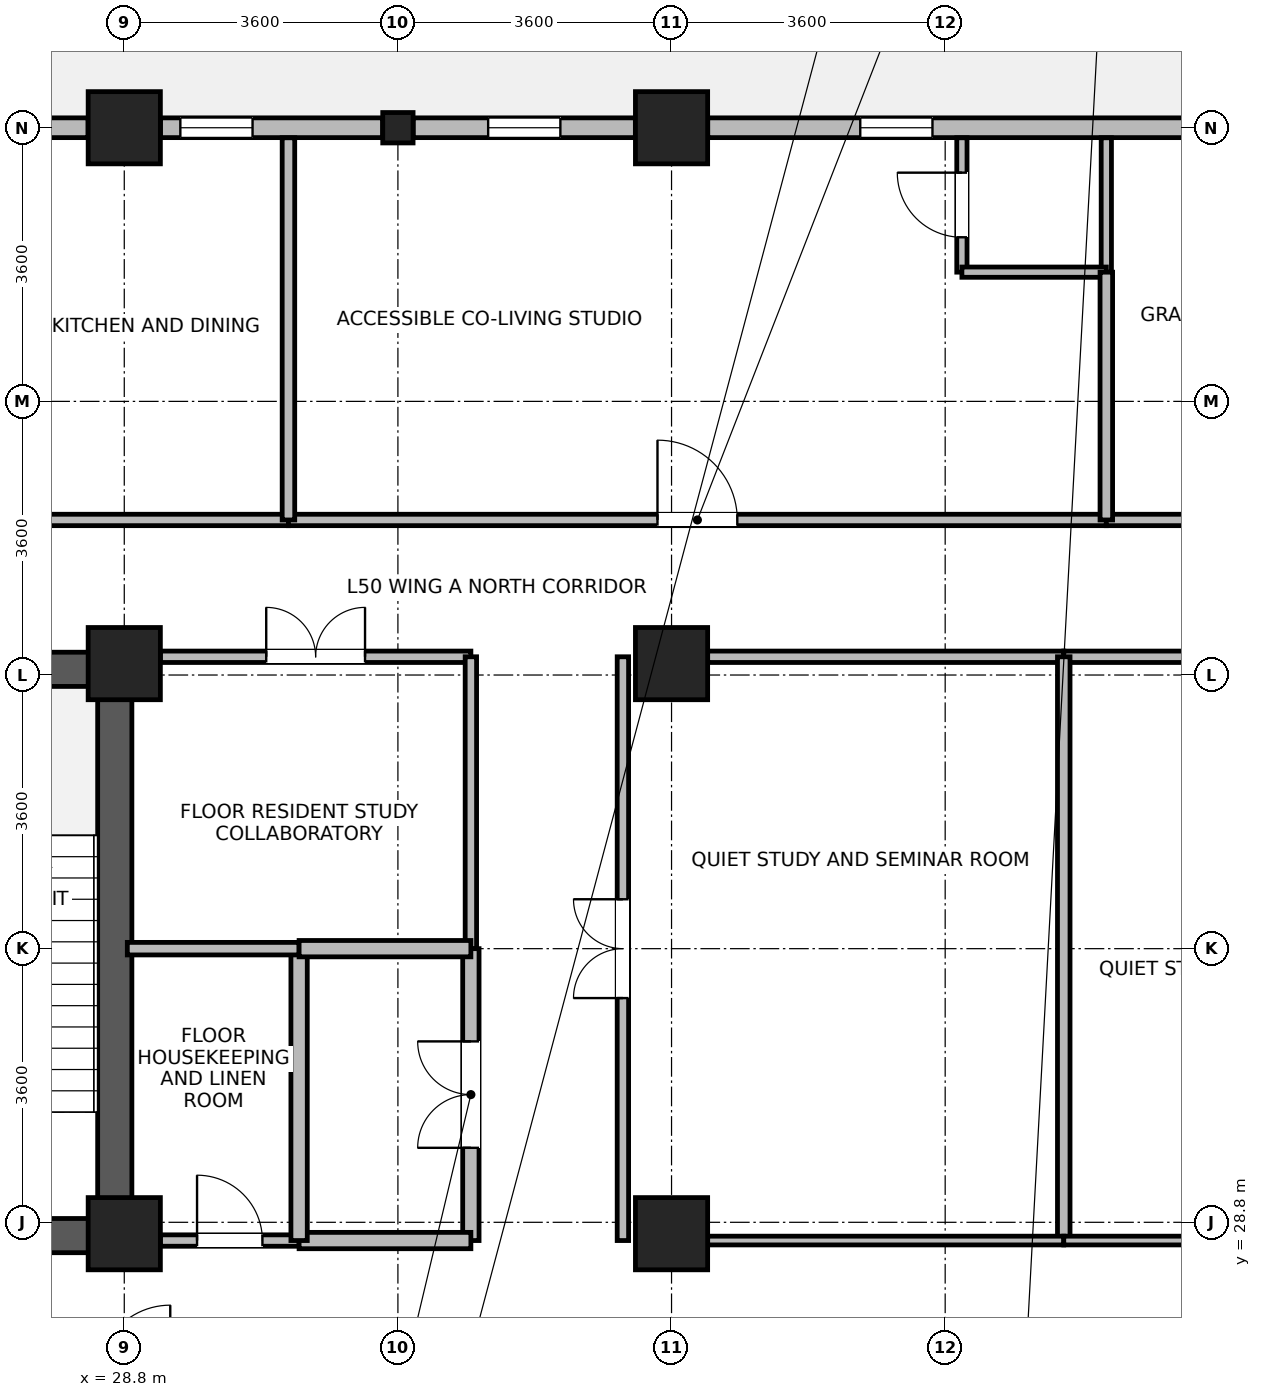
"""IFC4 building model, lengths in metres.
Left out: names, types, materials, properties, quantities, classifications, styles, units other than length and angle.
Written with IfcOpenShell. Run it as: python <this file> out.ifc"""

import sys

from ifc_helpers import new_model, si_unit, direction, frame, frame_2d, origin, origin_2d, place, context, subcontext, project, spatial, rectangle, i_section, extrude, source, transform, mapped, element, fill, save


model = new_model("IFC4")
c1 = context("Model", 3, precision=1e-05, world=origin(), true_north=direction((0.0, 1.0)))
c2 = subcontext(c1, "Body", "Model", "MODEL_VIEW")
j1 = project(units=[si_unit("LENGTHUNIT", "METRE"), si_unit("PLANEANGLEUNIT", "RADIAN")], contexts=[c1])
p1 = place(None, origin())
s1 = spatial("IfcSite", under=j1, at=p1, CompositionType="ELEMENT")
p2 = place(p1, origin())
s2 = spatial("IfcBuilding", under=s1, at=p2, CompositionType="ELEMENT")
p3 = place(p2, frame((0.0, 0.0, 197.2)))
s3 = spatial("IfcBuildingStorey", under=s2, at=p3, CompositionType="ELEMENT", Elevation=197.2)
p4 = place(p3, frame((28.675, 28.4, 0.0), z_axis=(0.0, 0.0, 1.0), x_axis=(0.0, 1.0, 0.0)))
e1 = element("IfcWall", 1, at=p4, inside=s3, PredefinedType="SHEAR", context=c2, shape_type="SweptSolid", body=[
    extrude(rectangle(XDim=7.9, YDim=0.45, at=frame_2d((3.95, 0.0))), origin(), (0.0, 0.0, 1.0), 4.37),
])
for number, where, z_axis, x_axis in (
    (2, (25.25, 28.625, 0.0), (0.0, 0.0, 1.0), (1.0, 0.0, 0.0)),
    (3, (25.25, 36.075, 0.0), (0.0, 0.0, 1.0), (1.0, 0.0, 0.0)),
):
    element("IfcWall", number, at=place(p3, frame(where, z_axis=z_axis, x_axis=x_axis)), inside=s3, PredefinedType="SHEAR", context=c2, shape_type="SweptSolid", body=[
        extrude(rectangle(XDim=3.2, YDim=0.45, at=frame_2d((1.6, 0.0))), origin(), (0.0, 0.0, 1.0), 4.37),
    ])
m1 = source(origin(), c2, "Body", "SweptSolid", [
    extrude(rectangle(XDim=0.95, YDim=0.95, at=origin_2d()), origin(), (0.0, 0.0, 1.0), 4.6),
])
for number, where, z_axis, x_axis in (
    (4, (28.8, 28.65, 0.0), (0.0, 0.0, 1.0), (1.0, 0.0, 0.0)),
    (5, (28.8, 36.15, 0.0), (0.0, 0.0, 1.0), (1.0, 0.0, 0.0)),
    (6, (28.8, 43.2, 0.0), (0.0, 0.0, 1.0), (1.0, 0.0, 0.0)),
    (7, (36.0, 43.2, 0.0), (0.0, 0.0, 1.0), (1.0, 0.0, 0.0)),
    (8, (36.0, 28.65, 0.0), (0.0, 0.0, 1.0), (1.0, 0.0, 0.0)),
    (9, (36.0, 36.15, 0.0), (0.0, 0.0, 1.0), (1.0, 0.0, 0.0)),
):
    element("IfcColumn", number, at=place(p3, frame(where, z_axis=z_axis, x_axis=x_axis)), inside=s3, PredefinedType="COLUMN", context=c2, shape_type="MappedRepresentation", body=[
        mapped(m1, transform((0.0, 0.0, 0.0), x_axis=(1.0, 0.0, 0.0), y_axis=(0.0, 1.0, 0.0), z_axis=(0.0, 0.0, 1.0), scale=1.0)),
    ])
m2 = source(origin(), c2, "Body", "SweptSolid", [
    extrude(i_section(OverallWidth=0.399, OverallDepth=0.4, WebThickness=0.017, FlangeThickness=0.023, FilletRadius=0.015, at=origin_2d()), origin(), (0.0, 0.0, 1.0), 4.6),
])
p5 = place(p3, frame((32.4, 43.2, 0.0), z_axis=(0.0, 0.0, 1.0), x_axis=(1.0, 0.0, 0.0)))
e10 = element("IfcColumn", 10, at=p5, inside=s3, PredefinedType="COLUMN", context=c2, shape_type="MappedRepresentation", body=[
    mapped(m2, transform((0.0, 0.0, 0.0), x_axis=(1.0, 0.0, 0.0), y_axis=(0.0, 1.0, 0.0), z_axis=(0.0, 0.0, 1.0), scale=1.0)),
])
p6 = place(p3, frame((36.476, 43.2, 0.0), z_axis=(0.0, 0.0, 1.0), x_axis=(1.0, 0.0, 0.0)))
e11 = element("IfcWall", 11, at=p6, inside=s3, PredefinedType="STANDARD", context=c2, shape_type="SweptSolid", body=[
    extrude(rectangle(XDim=9.848, YDim=0.26, at=frame_2d((4.924, 0.0))), origin(), (0.0, 0.0, 1.0), 3.9),
])
p7 = place(p6, frame((2.007, 0.0, 0.85)))
e12 = element("IfcOpeningElement", 12, at=p7, cuts=e11, PredefinedType="OPENING", context=c2, shape_type="SweptSolid", body=[
    extrude(rectangle(XDim=0.95, YDim=1.75, at=frame_2d((0.475, 0.875))), frame((0.0, 0.14, 0.0), z_axis=(0.0, -1.0, 0.0), x_axis=(1.0, 0.0, 0.0)), (0.0, 0.0, 1.0), 0.28),
])
p8 = place(p6, frame((6.891, 0.0, 0.85)))
e13 = element("IfcOpeningElement", 13, at=p8, cuts=e11, PredefinedType="OPENING", context=c2, shape_type="SweptSolid", body=[
    extrude(rectangle(XDim=0.95, YDim=1.75, at=frame_2d((0.475, 0.875))), frame((0.0, 0.14, 0.0), z_axis=(0.0, -1.0, 0.0), x_axis=(1.0, 0.0, 0.0)), (0.0, 0.0, 1.0), 0.28),
])
p9 = place(p3, frame((32.601, 43.2, 0.0), z_axis=(0.0, 0.0, 1.0), x_axis=(1.0, 0.0, 0.0)))
e14 = element("IfcWall", 14, at=p9, inside=s3, PredefinedType="STANDARD", context=c2, shape_type="SweptSolid", body=[
    extrude(rectangle(XDim=2.923, YDim=0.26, at=frame_2d((1.462, 0.0))), origin(), (0.0, 0.0, 1.0), 3.9),
])
p10 = place(p9, frame((0.987, 0.0, 0.85)))
e15 = element("IfcOpeningElement", 15, at=p10, cuts=e14, PredefinedType="OPENING", context=c2, shape_type="SweptSolid", body=[
    extrude(rectangle(XDim=0.95, YDim=1.75, at=frame_2d((0.475, 0.875))), frame((0.0, 0.14, 0.0), z_axis=(0.0, -1.0, 0.0), x_axis=(1.0, 0.0, 0.0)), (0.0, 0.0, 1.0), 0.28),
])
p11 = place(p3, frame((29.276, 43.2, 0.0), z_axis=(0.0, 0.0, 1.0), x_axis=(1.0, 0.0, 0.0)))
e16 = element("IfcWall", 16, at=p11, inside=s3, PredefinedType="STANDARD", context=c2, shape_type="SweptSolid", body=[
    extrude(rectangle(XDim=2.924, YDim=0.26, at=frame_2d((1.462, 0.0))), origin(), (0.0, 0.0, 1.0), 3.9),
])
p12 = place(p11, frame((0.262, 0.0, 0.85)))
e17 = element("IfcOpeningElement", 17, at=p12, cuts=e16, PredefinedType="OPENING", context=c2, shape_type="SweptSolid", body=[
    extrude(rectangle(XDim=0.95, YDim=1.75, at=frame_2d((0.475, 0.875))), frame((0.0, 0.14, 0.0), z_axis=(0.0, -1.0, 0.0), x_axis=(1.0, 0.0, 0.0)), (0.0, 0.0, 1.0), 0.28),
])
p13 = place(p3, frame((25.4, 43.2, 0.0), z_axis=(0.0, 0.0, 1.0), x_axis=(1.0, 0.0, 0.0)))
e18 = element("IfcWall", 18, at=p13, inside=s3, PredefinedType="STANDARD", context=c2, shape_type="SweptSolid", body=[
    extrude(rectangle(XDim=2.924, YDim=0.26, at=frame_2d((1.462, 0.0))), origin(), (0.0, 0.0, 1.0), 3.9),
])
p14 = place(p13, frame((0.987, 0.0, 0.85)))
e19 = element("IfcOpeningElement", 19, at=p14, cuts=e18, PredefinedType="OPENING", context=c2, shape_type="SweptSolid", body=[
    extrude(rectangle(XDim=0.95, YDim=1.75, at=frame_2d((0.475, 0.875))), frame((0.0, 0.14, 0.0), z_axis=(0.0, -1.0, 0.0), x_axis=(1.0, 0.0, 0.0)), (0.0, 0.0, 1.0), 0.28),
])
p15 = place(p3, frame((39.82, 41.3, 0.0), z_axis=(0.0, 0.0, 1.0), x_axis=(0.0, 1.0, 0.0)))
e20 = element("IfcWall", 20, at=p15, inside=s3, PredefinedType="PARTITIONING", context=c2, shape_type="SweptSolid", body=[
    extrude(rectangle(XDim=1.768, YDim=0.135, at=frame_2d((0.884, 0.0))), origin(), (0.0, 0.0, 1.0), 4.35),
])
p16 = place(p15, frame((0.459, 0.0, 0.0)))
e21 = element("IfcOpeningElement", 21, at=p16, cuts=e20, PredefinedType="OPENING", context=c2, shape_type="SweptSolid", body=[
    extrude(rectangle(XDim=0.85, YDim=2.04, at=frame_2d((0.425, 1.02))), frame((0.0, 0.078, 0.0), z_axis=(0.0, -1.0, 0.0), x_axis=(1.0, 0.0, 0.0)), (0.0, 0.0, 1.0), 0.155),
])
p17 = place(p3, frame((41.72, 41.3, 0.0), z_axis=(0.0, 0.0, 1.0), x_axis=(0.0, 1.0, 0.0)))
e22 = element("IfcWall", 22, at=p17, inside=s3, PredefinedType="PARTITIONING", context=c2, shape_type="SweptSolid", body=[
    extrude(rectangle(XDim=1.768, YDim=0.135, at=frame_2d((0.884, 0.0))), origin(), (0.0, 0.0, 1.0), 4.35),
])
p18 = place(p3, frame((39.82, 41.3, 0.0), z_axis=(0.0, 0.0, 1.0), x_axis=(1.0, 0.0, 0.0)))
e23 = element("IfcWall", 23, at=p18, inside=s3, PredefinedType="PARTITIONING", context=c2, shape_type="SweptSolid", body=[
    extrude(rectangle(XDim=1.9, YDim=0.135, at=frame_2d((0.95, 0.0))), origin(), (0.0, 0.0, 1.0), 4.35),
])
p19 = place(p3, frame((19.38, 38.04, 0.0), z_axis=(0.0, 0.0, 1.0), x_axis=(1.0, 0.0, 0.0)))
e24 = element("IfcWall", 24, at=p19, inside=s3, PredefinedType="PARTITIONING", context=c2, shape_type="SweptSolid", body=[
    extrude(rectangle(XDim=11.58, YDim=0.15, at=frame_2d((5.79, 0.0))), origin(), (0.0, 0.0, 1.0), 4.35),
])
p20 = place(p19, frame((5.34, 0.0, 0.0)))
e25 = element("IfcOpeningElement", 25, at=p20, cuts=e24, PredefinedType="OPENING", context=c2, shape_type="SweptSolid", body=[
    extrude(rectangle(XDim=0.9, YDim=2.08, at=frame_2d((0.45, 1.04))), frame((0.0, 0.085, 0.0), z_axis=(0.0, -1.0, 0.0), x_axis=(1.0, 0.0, 0.0)), (0.0, 0.0, 1.0), 0.17),
])
p21 = place(p3, frame((30.96, 38.04, 0.0), z_axis=(0.0, 0.0, 1.0), x_axis=(1.0, 0.0, 0.0)))
e26 = element("IfcWall", 26, at=p21, inside=s3, PredefinedType="PARTITIONING", context=c2, shape_type="SweptSolid", body=[
    extrude(rectangle(XDim=10.76, YDim=0.15, at=frame_2d((5.38, 0.0))), origin(), (0.0, 0.0, 1.0), 4.35),
])
p22 = place(p21, frame((4.855, 0.0, 0.0)))
e27 = element("IfcOpeningElement", 27, at=p22, cuts=e26, PredefinedType="OPENING", context=c2, shape_type="SweptSolid", body=[
    extrude(rectangle(XDim=1.05, YDim=2.12, at=frame_2d((0.525, 1.06))), frame((0.0, 0.085, 0.0), z_axis=(0.0, -1.0, 0.0), x_axis=(1.0, 0.0, 0.0)), (0.0, 0.0, 1.0), 0.17),
])
p23 = place(p3, frame((41.72, 38.04, 0.0), z_axis=(0.0, 0.0, 1.0), x_axis=(1.0, 0.0, 0.0)))
e28 = element("IfcWall", 28, at=p23, inside=s3, PredefinedType="PARTITIONING", context=c2, shape_type="SweptSolid", body=[
    extrude(rectangle(XDim=8.92, YDim=0.15, at=frame_2d((4.46, 0.0))), origin(), (0.0, 0.0, 1.0), 4.35),
])
p24 = place(p23, frame((3.985, 0.0, 0.0)))
e29 = element("IfcOpeningElement", 29, at=p24, cuts=e28, PredefinedType="OPENING", context=c2, shape_type="SweptSolid", body=[
    extrude(rectangle(XDim=0.95, YDim=2.1, at=frame_2d((0.475, 1.05))), frame((0.0, 0.085, 0.0), z_axis=(0.0, -1.0, 0.0), x_axis=(1.0, 0.0, 0.0)), (0.0, 0.0, 1.0), 0.17),
])
p25 = place(p3, frame((35.36, 28.56, 0.0), z_axis=(0.0, 0.0, 1.0), x_axis=(0.0, 1.0, 0.0)))
e30 = element("IfcWall", 30, at=p25, inside=s3, PredefinedType="PARTITIONING", context=c2, shape_type="SweptSolid", body=[
    extrude(rectangle(XDim=7.68, YDim=0.15, at=frame_2d((3.84, 0.0))), origin(), (0.0, 0.0, 1.0), 4.35),
])
p26 = place(p25, frame((3.19, 0.0, 0.0)))
e31 = element("IfcOpeningElement", 31, at=p26, cuts=e30, PredefinedType="OPENING", context=c2, shape_type="SweptSolid", body=[
    extrude(rectangle(XDim=1.3, YDim=2.12, at=frame_2d((0.65, 1.06))), frame((0.0, 0.085, 0.0), z_axis=(0.0, -1.0, 0.0), x_axis=(1.0, 0.0, 0.0)), (0.0, 0.0, 1.0), 0.17),
])
p27 = place(p3, frame((36.475, 36.24, 0.0), z_axis=(0.0, 0.0, 1.0), x_axis=(1.0, 0.0, 0.0)))
e32 = element("IfcWall", 32, at=p27, inside=s3, PredefinedType="PARTITIONING", context=c2, shape_type="SweptSolid", body=[
    extrude(rectangle(XDim=4.685, YDim=0.15, at=frame_2d((2.342, 0.0))), origin(), (0.0, 0.0, 1.0), 3.75),
])
p28 = place(p3, frame((41.16, 36.24, 0.0), z_axis=(0.0, 0.0, 1.0), x_axis=(1.0, 0.0, 0.0)))
e33 = element("IfcWall", 33, at=p28, inside=s3, PredefinedType="PARTITIONING", context=c2, shape_type="SweptSolid", body=[
    extrude(rectangle(XDim=5.165, YDim=0.15, at=frame_2d((2.583, 0.0))), origin(), (0.0, 0.0, 1.0), 3.75),
])
p29 = place(p28, frame((1.933, 0.0, 0.0)))
e34 = element("IfcOpeningElement", 34, at=p29, cuts=e33, PredefinedType="OPENING", context=c2, shape_type="SweptSolid", body=[
    extrude(rectangle(XDim=1.3, YDim=2.12, at=frame_2d((0.65, 1.06))), frame((0.0, 0.085, 0.0), z_axis=(0.0, -1.0, 0.0), x_axis=(1.0, 0.0, 0.0)), (0.0, 0.0, 1.0), 0.17),
])
p30 = place(p3, frame((29.275, 36.24, 0.0), z_axis=(0.0, 0.0, 1.0), x_axis=(1.0, 0.0, 0.0)))
e35 = element("IfcWall", 35, at=p30, inside=s3, PredefinedType="PARTITIONING", context=c2, shape_type="SweptSolid", body=[
    extrude(rectangle(XDim=4.085, YDim=0.15, at=frame_2d((2.042, 0.0))), origin(), (0.0, 0.0, 1.0), 3.75),
])
p31 = place(p30, frame((1.393, 0.0, 0.0)))
e36 = element("IfcOpeningElement", 36, at=p31, cuts=e35, PredefinedType="OPENING", context=c2, shape_type="SweptSolid", body=[
    extrude(rectangle(XDim=1.3, YDim=2.12, at=frame_2d((0.65, 1.06))), frame((0.0, 0.085, 0.0), z_axis=(0.0, -1.0, 0.0), x_axis=(1.0, 0.0, 0.0)), (0.0, 0.0, 1.0), 0.17),
])
p32 = place(p3, frame((33.36, 32.4, 0.0), z_axis=(0.0, 0.0, 1.0), x_axis=(0.0, 1.0, 0.0)))
e37 = element("IfcWall", 37, at=p32, inside=s3, PredefinedType="PARTITIONING", context=c2, shape_type="SweptSolid", body=[
    extrude(rectangle(XDim=3.84, YDim=0.15, at=frame_2d((1.92, 0.0))), origin(), (0.0, 0.0, 1.0), 4.35),
])
p33 = place(p3, frame((33.36, 28.56, 0.0), z_axis=(0.0, 0.0, 1.0), x_axis=(0.0, 1.0, 0.0)))
e38 = element("IfcWall", 38, at=p33, inside=s3, PredefinedType="PARTITIONING", context=c2, shape_type="SweptSolid", body=[
    extrude(rectangle(XDim=3.84, YDim=0.215, at=frame_2d((1.92, 0.0))), origin(), (0.0, 0.0, 1.0), 4.35),
])
p34 = place(p33, frame((1.22, 0.0, 0.0)))
e39 = element("IfcOpeningElement", 39, at=p34, cuts=e38, PredefinedType="OPENING", context=c2, shape_type="SweptSolid", body=[
    extrude(rectangle(XDim=1.4, YDim=2.15, at=frame_2d((0.7, 1.075))), frame((0.0, 0.118, 0.0), z_axis=(0.0, -1.0, 0.0), x_axis=(1.0, 0.0, 0.0)), (0.0, 0.0, 1.0), 0.235),
])
p35 = place(p3, frame((29.275, 28.56, 0.0), z_axis=(0.0, 0.0, 1.0), x_axis=(1.0, 0.0, 0.0)))
e40 = element("IfcWall", 40, at=p35, inside=s3, PredefinedType="PARTITIONING", context=c2, shape_type="SweptSolid", body=[
    extrude(rectangle(XDim=1.825, YDim=0.15, at=frame_2d((0.913, 0.0))), origin(), (0.0, 0.0, 1.0), 3.75),
])
p36 = place(p35, frame((0.482, 0.0, 0.0)))
e41 = element("IfcOpeningElement", 41, at=p36, cuts=e40, PredefinedType="OPENING", context=c2, shape_type="SweptSolid", body=[
    extrude(rectangle(XDim=0.86, YDim=2.02, at=frame_2d((0.43, 1.01))), frame((0.0, 0.085, 0.0), z_axis=(0.0, -1.0, 0.0), x_axis=(1.0, 0.0, 0.0)), (0.0, 0.0, 1.0), 0.17),
])
p37 = place(p3, frame((31.1, 28.56, 0.0), z_axis=(0.0, 0.0, 1.0), x_axis=(1.0, 0.0, 0.0)))
e42 = element("IfcWall", 42, at=p37, inside=s3, PredefinedType="PARTITIONING", context=c2, shape_type="SweptSolid", body=[
    extrude(rectangle(XDim=2.26, YDim=0.215, at=frame_2d((1.13, 0.0))), origin(), (0.0, 0.0, 1.0), 3.75),
])
p38 = place(p3, frame((41.16, 28.56, 0.0), z_axis=(0.0, 0.0, 1.0), x_axis=(0.0, 1.0, 0.0)))
e43 = element("IfcWall", 43, at=p38, inside=s3, PredefinedType="PARTITIONING", context=c2, shape_type="SweptSolid", body=[
    extrude(rectangle(XDim=7.68, YDim=0.165, at=frame_2d((3.84, 0.0))), origin(), (0.0, 0.0, 1.0), 4.35),
])
p39 = place(p3, frame((36.475, 28.56, 0.0), z_axis=(0.0, 0.0, 1.0), x_axis=(1.0, 0.0, 0.0)))
e44 = element("IfcWall", 44, at=p39, inside=s3, PredefinedType="PARTITIONING", context=c2, shape_type="SweptSolid", body=[
    extrude(rectangle(XDim=4.685, YDim=0.115, at=frame_2d((2.342, 0.0))), origin(), (0.0, 0.0, 1.0), 3.75),
])
p40 = place(p3, frame((41.16, 28.56, 0.0), z_axis=(0.0, 0.0, 1.0), x_axis=(1.0, 0.0, 0.0)))
e45 = element("IfcWall", 45, at=p40, inside=s3, PredefinedType="PARTITIONING", context=c2, shape_type="SweptSolid", body=[
    extrude(rectangle(XDim=5.165, YDim=0.115, at=frame_2d((2.583, 0.0))), origin(), (0.0, 0.0, 1.0), 3.75),
])
p41 = place(p3, frame((30.96, 38.04, 0.0), z_axis=(0.0, 0.0, 1.0), x_axis=(0.0, 1.0, 0.0)))
e46 = element("IfcWall", 46, at=p41, inside=s3, PredefinedType="PARTITIONING", context=c2, shape_type="SweptSolid", body=[
    extrude(rectangle(XDim=5.028, YDim=0.165, at=frame_2d((2.514, 0.0))), origin(), (0.0, 0.0, 1.0), 4.35),
])
p42 = place(p3, frame((31.1, 28.56, 0.0), z_axis=(0.0, 0.0, 1.0), x_axis=(0.0, 1.0, 0.0)))
e47 = element("IfcWall", 47, at=p42, inside=s3, PredefinedType="PARTITIONING", context=c2, shape_type="SweptSolid", body=[
    extrude(rectangle(XDim=3.84, YDim=0.215, at=frame_2d((1.92, 0.0))), origin(), (0.0, 0.0, 1.0), 4.35),
])
p43 = place(p3, frame((41.72, 38.04, 0.0), z_axis=(0.0, 0.0, 1.0), x_axis=(0.0, 1.0, 0.0)))
e48 = element("IfcWall", 48, at=p43, inside=s3, PredefinedType="PARTITIONING", context=c2, shape_type="SweptSolid", body=[
    extrude(rectangle(XDim=3.26, YDim=0.165, at=frame_2d((1.63, 0.0))), origin(), (0.0, 0.0, 1.0), 4.35),
])
p44 = place(p3, frame((28.84, 32.4, 0.0), z_axis=(0.0, 0.0, 1.0), x_axis=(1.0, 0.0, 0.0)))
e49 = element("IfcWall", 49, at=p44, inside=s3, PredefinedType="PARTITIONING", context=c2, shape_type="SweptSolid", body=[
    extrude(rectangle(XDim=2.26, YDim=0.165, at=frame_2d((1.13, 0.0))), origin(), (0.0, 0.0, 1.0), 4.35),
])
p45 = place(p3, frame((31.1, 32.4, 0.0), z_axis=(0.0, 0.0, 1.0), x_axis=(1.0, 0.0, 0.0)))
e50 = element("IfcWall", 50, at=p45, inside=s3, PredefinedType="PARTITIONING", context=c2, shape_type="SweptSolid", body=[
    extrude(rectangle(XDim=2.26, YDim=0.215, at=frame_2d((1.13, 0.0))), origin(), (0.0, 0.0, 1.0), 4.35),
])
p46 = place(p7, origin())
e51 = element("IfcWindow", 51, at=p46, inside=s3, PartitioningType="SINGLE_PANEL", PredefinedType="WINDOW", context=c2, shape_type="SweptSolid", body=[
    extrude(rectangle(XDim=0.95, YDim=1.75, at=frame_2d((0.475, 0.875))), frame((0.0, 0.03, 0.0), z_axis=(0.0, -1.0, 0.0), x_axis=(1.0, 0.0, 0.0)), (0.0, 0.0, 1.0), 0.06),
])
fill(e12, e51)
p47 = place(p10, origin())
e52 = element("IfcWindow", 52, at=p47, inside=s3, PartitioningType="SINGLE_PANEL", PredefinedType="WINDOW", context=c2, shape_type="SweptSolid", body=[
    extrude(rectangle(XDim=0.95, YDim=1.75, at=frame_2d((0.475, 0.875))), frame((0.0, 0.03, 0.0), z_axis=(0.0, -1.0, 0.0), x_axis=(1.0, 0.0, 0.0)), (0.0, 0.0, 1.0), 0.06),
])
fill(e15, e52)
p48 = place(p12, origin())
e53 = element("IfcWindow", 53, at=p48, inside=s3, PartitioningType="SINGLE_PANEL", PredefinedType="WINDOW", context=c2, shape_type="SweptSolid", body=[
    extrude(rectangle(XDim=0.95, YDim=1.75, at=frame_2d((0.475, 0.875))), frame((0.0, 0.03, 0.0), z_axis=(0.0, -1.0, 0.0), x_axis=(1.0, 0.0, 0.0)), (0.0, 0.0, 1.0), 0.06),
])
fill(e17, e53)
p49 = place(p16, origin())
e54 = element("IfcDoor", 54, at=p49, inside=s3, OperationType="SINGLE_SWING_RIGHT", PredefinedType="DOOR", context=c2, shape_type="SweptSolid", body=[
    extrude(rectangle(XDim=0.85, YDim=2.04, at=frame_2d((0.425, 1.02))), frame((0.0, 0.025, 0.0), z_axis=(0.0, -1.0, 0.0), x_axis=(1.0, 0.0, 0.0)), (0.0, 0.0, 1.0), 0.05),
])
fill(e21, e54)
p50 = place(p22, origin())
e55 = element("IfcDoor", 55, at=p50, inside=s3, OperationType="SINGLE_SWING_LEFT", PredefinedType="DOOR", context=c2, shape_type="SweptSolid", body=[
    extrude(rectangle(XDim=1.05, YDim=2.12, at=frame_2d((0.525, 1.06))), frame((0.0, 0.025, 0.0), z_axis=(0.0, -1.0, 0.0), x_axis=(1.0, 0.0, 0.0)), (0.0, 0.0, 1.0), 0.05),
])
fill(e27, e55)
p51 = place(p26, origin())
e56 = element("IfcDoor", 56, at=p51, inside=s3, OperationType="DOUBLE_DOOR_SINGLE_SWING", PredefinedType="DOOR", context=c2, shape_type="SweptSolid", body=[
    extrude(rectangle(XDim=1.3, YDim=2.12, at=frame_2d((0.65, 1.06))), frame((0.0, 0.025, 0.0), z_axis=(0.0, -1.0, 0.0), x_axis=(1.0, 0.0, 0.0)), (0.0, 0.0, 1.0), 0.05),
])
fill(e31, e56)
p52 = place(p31, origin())
e57 = element("IfcDoor", 57, at=p52, inside=s3, OperationType="DOUBLE_DOOR_SINGLE_SWING", PredefinedType="DOOR", context=c2, shape_type="SweptSolid", body=[
    extrude(rectangle(XDim=1.3, YDim=2.12, at=frame_2d((0.65, 1.06))), frame((0.0, 0.025, 0.0), z_axis=(0.0, -1.0, 0.0), x_axis=(1.0, 0.0, 0.0)), (0.0, 0.0, 1.0), 0.05),
])
fill(e36, e57)
p53 = place(p34, origin())
e58 = element("IfcDoor", 58, at=p53, inside=s3, OperationType="DOUBLE_DOOR_SINGLE_SWING", PredefinedType="DOOR", context=c2, shape_type="SweptSolid", body=[
    extrude(rectangle(XDim=1.4, YDim=2.15, at=frame_2d((0.7, 1.075))), frame((0.0, 0.025, 0.0), z_axis=(0.0, -1.0, 0.0), x_axis=(1.0, 0.0, 0.0)), (0.0, 0.0, 1.0), 0.05),
])
fill(e39, e58)
p54 = place(p36, origin())
e59 = element("IfcDoor", 59, at=p54, inside=s3, OperationType="SINGLE_SWING_LEFT", PredefinedType="DOOR", context=c2, shape_type="SweptSolid", body=[
    extrude(rectangle(XDim=0.86, YDim=2.02, at=frame_2d((0.43, 1.01))), frame((0.0, 0.025, 0.0), z_axis=(0.0, -1.0, 0.0), x_axis=(1.0, 0.0, 0.0)), (0.0, 0.0, 1.0), 0.05),
])
fill(e41, e59)
save(model, sys.argv[1])
